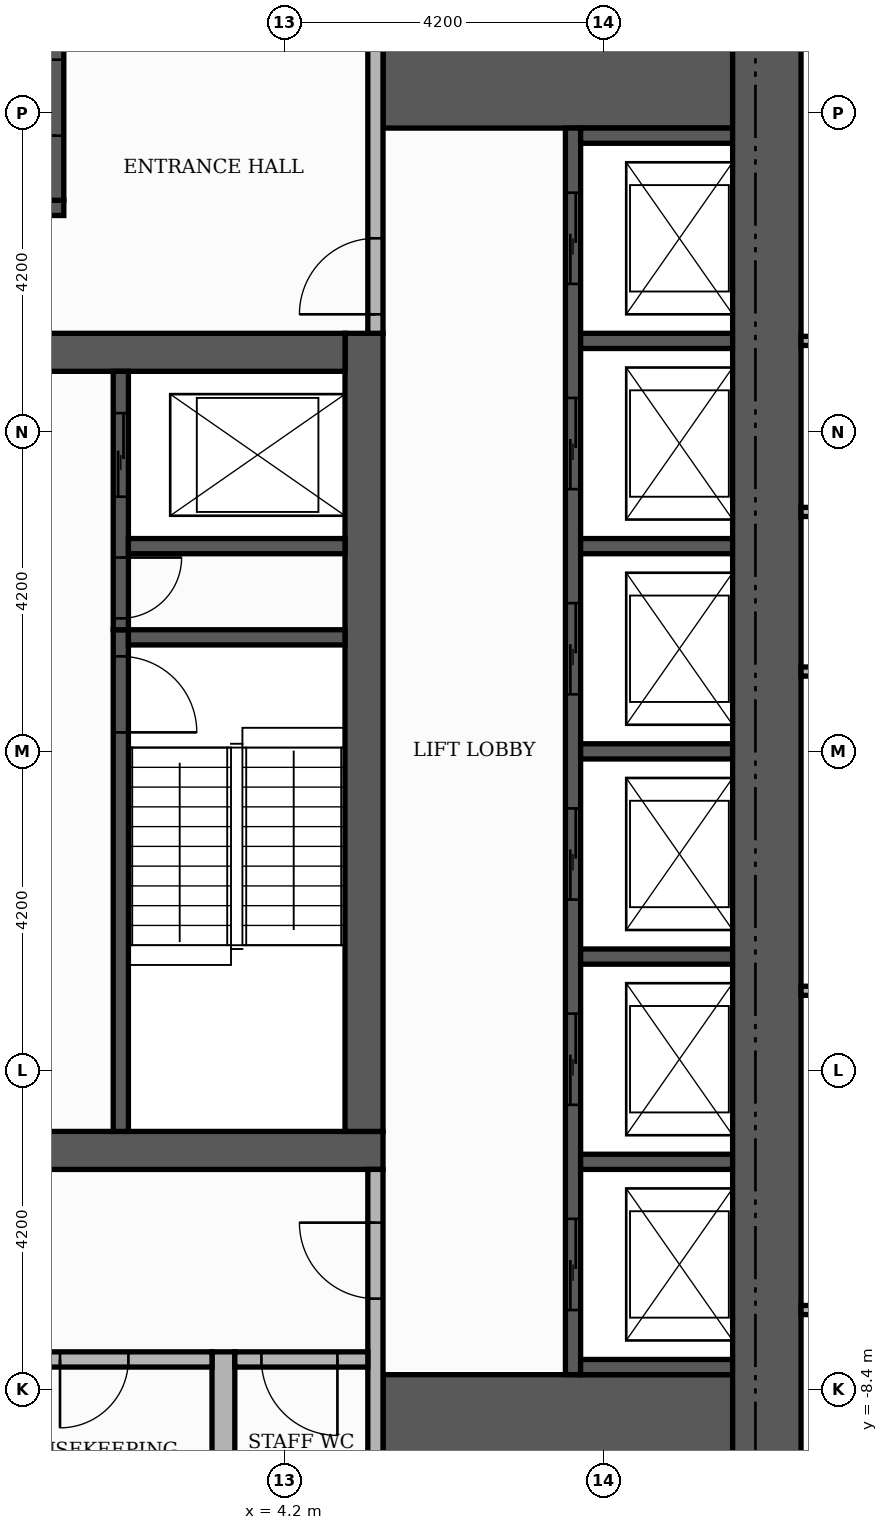
"""IFC4 building model, lengths in metres.
Left out: names, types, materials, properties, quantities, classifications, styles, units other than length and angle.
Written with IfcOpenShell. Run it as: python <this file> out.ifc"""

import sys

from ifc_helpers import new_model, si_unit, direction, frame, frame_2d, origin, place, context, subcontext, project, spatial, rectangle, extrude, element, fill, save


model = new_model("IFC4")
c1 = context("Model", 3, precision=1e-05, world=origin(), true_north=direction((0.0, 1.0)))
c2 = subcontext(c1, "Body", "Model", "MODEL_VIEW")
j1 = project(units=[si_unit("LENGTHUNIT", "METRE"), si_unit("PLANEANGLEUNIT", "RADIAN")], contexts=[c1])
p1 = place(None, origin())
s1 = spatial("IfcSite", under=j1, at=p1, CompositionType="ELEMENT")
p2 = place(p1, origin())
s2 = spatial("IfcBuilding", under=s1, at=p2, CompositionType="ELEMENT")
p3 = place(p2, frame((0.0, 0.0, 211.8)))
s3 = spatial("IfcBuildingStorey", under=s2, at=p3, CompositionType="ELEMENT", Elevation=211.8)
p4 = place(p3, frame((-5.5, -5.25, 0.0), z_axis=(0.0, 0.0, 1.0), x_axis=(1.0, 0.0, 0.0)))
e1 = element("IfcWall", 1, at=p4, inside=s3, PredefinedType="SHEAR", context=c2, shape_type="SweptSolid", body=[
    extrude(rectangle(XDim=11.0, YDim=0.5, at=frame_2d((5.5, 0.0))), origin(), (0.0, 0.0, 1.0), 3.48),
])
p5 = place(p4, frame((4.9, 0.0, 0.0)))
e2 = element("IfcOpeningElement", 2, at=p5, cuts=e1, PredefinedType="OPENING", context=c2, shape_type="SweptSolid", body=[
    extrude(rectangle(XDim=1.2, YDim=2.1, at=frame_2d((0.6, 1.05))), frame((0.0, 0.26, 0.0), z_axis=(0.0, -1.0, 0.0), x_axis=(1.0, 0.0, 0.0)), (0.0, 0.0, 1.0), 0.52),
])
p6 = place(p3, frame((5.25, -5.0, 0.0), z_axis=(0.0, 0.0, 1.0), x_axis=(0.0, 1.0, 0.0)))
e3 = element("IfcWall", 3, at=p6, inside=s3, PredefinedType="SHEAR", context=c2, shape_type="SweptSolid", body=[
    extrude(rectangle(XDim=10.5, YDim=0.5, at=frame_2d((5.25, 0.0))), origin(), (0.0, 0.0, 1.0), 3.48),
])
p7 = place(p3, frame((-5.0, 5.25, 0.0), z_axis=(0.0, 0.0, 1.0), x_axis=(1.0, 0.0, 0.0)))
e4 = element("IfcWall", 4, at=p7, inside=s3, PredefinedType="SHEAR", context=c2, shape_type="SweptSolid", body=[
    extrude(rectangle(XDim=10.0, YDim=0.5, at=frame_2d((5.0, 0.0))), origin(), (0.0, 0.0, 1.0), 3.48),
])
p8 = place(p7, frame((4.4, 0.0, 0.0)))
e5 = element("IfcOpeningElement", 5, at=p8, cuts=e4, PredefinedType="OPENING", context=c2, shape_type="SweptSolid", body=[
    extrude(rectangle(XDim=1.2, YDim=2.1, at=frame_2d((0.6, 1.05))), frame((0.0, 0.26, 0.0), z_axis=(0.0, -1.0, 0.0), x_axis=(1.0, 0.0, 0.0)), (0.0, 0.0, 1.0), 0.52),
])
for number, where, z_axis, x_axis in (
    (6, (5.5, -9.15, 0.0), (0.0, 0.0, 1.0), (1.0, 0.0, 0.0)),
    (7, (5.5, 9.15, 0.0), (0.0, 0.0, 1.0), (1.0, 0.0, 0.0)),
):
    element("IfcWall", number, at=place(p3, frame(where, z_axis=z_axis, x_axis=x_axis)), inside=s3, PredefinedType="SHEAR", context=c2, shape_type="SweptSolid", body=[
        extrude(rectangle(XDim=4.6, YDim=1.9, at=frame_2d((2.3, 0.0))), origin(), (0.0, 0.0, 1.0), 3.48),
    ])
p9 = place(p3, frame((2.05, -5.0, 0.0), z_axis=(0.0, 0.0, 1.0), x_axis=(0.0, 1.0, 0.0)))
e8 = element("IfcWall", 8, at=p9, inside=s3, PredefinedType="SHEAR", context=c2, shape_type="SweptSolid", body=[
    extrude(rectangle(XDim=6.6, YDim=0.2, at=frame_2d((3.3, 0.0))), origin(), (0.0, 0.0, 1.0), 3.48),
])
p10 = place(p9, frame((5.25, 0.0, 0.0)))
e9 = element("IfcOpeningElement", 9, at=p10, cuts=e8, PredefinedType="OPENING", context=c2, shape_type="SweptSolid", body=[
    extrude(rectangle(XDim=1.0, YDim=2.1, at=frame_2d((0.5, 1.05))), frame((0.0, 0.11, 0.0), z_axis=(0.0, -1.0, 0.0), x_axis=(1.0, 0.0, 0.0)), (0.0, 0.0, 1.0), 0.22),
])
p11 = place(p3, frame((2.15, 1.5, 0.0), z_axis=(0.0, 0.0, 1.0), x_axis=(1.0, 0.0, 0.0)))
e10 = element("IfcWall", 10, at=p11, inside=s3, PredefinedType="SHEAR", context=c2, shape_type="SweptSolid", body=[
    extrude(rectangle(XDim=2.85, YDim=0.2, at=frame_2d((1.425, 0.0))), origin(), (0.0, 0.0, 1.0), 3.48),
])
p12 = place(p3, frame((-5.5, 7.15, 0.0), z_axis=(0.0, 0.0, 1.0), x_axis=(1.0, 0.0, 0.0)))
e11 = element("IfcWall", 11, at=p12, inside=s3, PredefinedType="SHEAR", context=c2, shape_type="SweptSolid", body=[
    extrude(rectangle(XDim=6.8, YDim=0.2, at=frame_2d((3.4, 0.0))), origin(), (0.0, 0.0, 1.0), 3.48),
])
p13 = place(p3, frame((1.2, 7.25, 0.0), z_axis=(0.0, 0.0, 1.0), x_axis=(0.0, 1.0, 0.0)))
e12 = element("IfcWall", 12, at=p13, inside=s3, PredefinedType="SHEAR", context=c2, shape_type="SweptSolid", body=[
    extrude(rectangle(XDim=2.85, YDim=0.2, at=frame_2d((1.425, 0.0))), origin(), (0.0, 0.0, 1.0), 3.48),
])
p14 = place(p13, frame((0.85, 0.0, 0.0)))
e13 = element("IfcOpeningElement", 13, at=p14, cuts=e12, PredefinedType="OPENING", context=c2, shape_type="SweptSolid", body=[
    extrude(rectangle(XDim=1.0, YDim=2.1, at=frame_2d((0.5, 1.05))), frame((0.0, 0.11, 0.0), z_axis=(0.0, -1.0, 0.0), x_axis=(1.0, 0.0, 0.0)), (0.0, 0.0, 1.0), 0.22),
])
p15 = place(p3, frame((8.0, -8.2, 0.0), z_axis=(0.0, 0.0, 1.0), x_axis=(0.0, 1.0, 0.0)))
e14 = element("IfcWall", 14, at=p15, inside=s3, PredefinedType="SHEAR", context=c2, shape_type="SweptSolid", body=[
    extrude(rectangle(XDim=16.4, YDim=0.2, at=frame_2d((8.2, 0.0))), origin(), (0.0, 0.0, 1.0), 3.48),
])
p16 = place(p15, frame((0.85, 0.0, 0.0)))
e15 = element("IfcOpeningElement", 15, at=p16, cuts=e14, PredefinedType="OPENING", context=c2, shape_type="SweptSolid", body=[
    extrude(rectangle(XDim=1.2, YDim=2.1, at=frame_2d((0.6, 1.05))), frame((0.0, 0.11, 0.0), z_axis=(0.0, -1.0, 0.0), x_axis=(1.0, 0.0, 0.0)), (0.0, 0.0, 1.0), 0.22),
])
p17 = place(p15, frame((3.55, 0.0, 0.0)))
e16 = element("IfcOpeningElement", 16, at=p17, cuts=e14, PredefinedType="OPENING", context=c2, shape_type="SweptSolid", body=[
    extrude(rectangle(XDim=1.2, YDim=2.1, at=frame_2d((0.6, 1.05))), frame((0.0, 0.11, 0.0), z_axis=(0.0, -1.0, 0.0), x_axis=(1.0, 0.0, 0.0)), (0.0, 0.0, 1.0), 0.22),
])
p18 = place(p15, frame((6.25, 0.0, 0.0)))
e17 = element("IfcOpeningElement", 17, at=p18, cuts=e14, PredefinedType="OPENING", context=c2, shape_type="SweptSolid", body=[
    extrude(rectangle(XDim=1.2, YDim=2.1, at=frame_2d((0.6, 1.05))), frame((0.0, 0.11, 0.0), z_axis=(0.0, -1.0, 0.0), x_axis=(1.0, 0.0, 0.0)), (0.0, 0.0, 1.0), 0.22),
])
p19 = place(p15, frame((8.95, 0.0, 0.0)))
e18 = element("IfcOpeningElement", 18, at=p19, cuts=e14, PredefinedType="OPENING", context=c2, shape_type="SweptSolid", body=[
    extrude(rectangle(XDim=1.2, YDim=2.1, at=frame_2d((0.6, 1.05))), frame((0.0, 0.11, 0.0), z_axis=(0.0, -1.0, 0.0), x_axis=(1.0, 0.0, 0.0)), (0.0, 0.0, 1.0), 0.22),
])
p20 = place(p15, frame((11.65, 0.0, 0.0)))
e19 = element("IfcOpeningElement", 19, at=p20, cuts=e14, PredefinedType="OPENING", context=c2, shape_type="SweptSolid", body=[
    extrude(rectangle(XDim=1.2, YDim=2.1, at=frame_2d((0.6, 1.05))), frame((0.0, 0.11, 0.0), z_axis=(0.0, -1.0, 0.0), x_axis=(1.0, 0.0, 0.0)), (0.0, 0.0, 1.0), 0.22),
])
p21 = place(p15, frame((14.35, 0.0, 0.0)))
e20 = element("IfcOpeningElement", 20, at=p21, cuts=e14, PredefinedType="OPENING", context=c2, shape_type="SweptSolid", body=[
    extrude(rectangle(XDim=1.2, YDim=2.1, at=frame_2d((0.6, 1.05))), frame((0.0, 0.11, 0.0), z_axis=(0.0, -1.0, 0.0), x_axis=(1.0, 0.0, 0.0)), (0.0, 0.0, 1.0), 0.22),
])
for number, where, z_axis, x_axis in (
    (21, (8.1, -8.1, 0.0), (0.0, 0.0, 1.0), (1.0, 0.0, 0.0)),
    (22, (8.1, -5.4, 0.0), (0.0, 0.0, 1.0), (1.0, 0.0, 0.0)),
    (23, (8.1, -2.7, 0.0), (0.0, 0.0, 1.0), (1.0, 0.0, 0.0)),
    (24, (8.1, 0.0, 0.0), (0.0, 0.0, 1.0), (1.0, 0.0, 0.0)),
):
    element("IfcWall", number, at=place(p3, frame(where, z_axis=z_axis, x_axis=x_axis)), inside=s3, PredefinedType="SHEAR", context=c2, shape_type="SweptSolid", body=[
        extrude(rectangle(XDim=2.0, YDim=0.2, at=frame_2d((1.0, 0.0))), origin(), (0.0, 0.0, 1.0), 3.48),
    ])
p22 = place(p3, frame((2.05, 1.6, 0.0), z_axis=(0.0, 0.0, 1.0), x_axis=(0.0, 1.0, 0.0)))
e25 = element("IfcWall", 25, at=p22, inside=s3, PredefinedType="SHEAR", context=c2, shape_type="SweptSolid", body=[
    extrude(rectangle(XDim=3.4, YDim=0.2, at=frame_2d((1.7, 0.0))), origin(), (0.0, 0.0, 1.0), 3.48),
])
p23 = place(p22, frame((1.75, 0.0, 0.0)))
e26 = element("IfcOpeningElement", 26, at=p23, cuts=e25, PredefinedType="OPENING", context=c2, shape_type="SweptSolid", body=[
    extrude(rectangle(XDim=1.1, YDim=2.1, at=frame_2d((0.55, 1.05))), frame((0.0, 0.11, 0.0), z_axis=(0.0, -1.0, 0.0), x_axis=(1.0, 0.0, 0.0)), (0.0, 0.0, 1.0), 0.22),
])
p24 = place(p22, frame((0.15, 0.0, 0.0)))
e27 = element("IfcOpeningElement", 27, at=p24, cuts=e25, PredefinedType="OPENING", context=c2, shape_type="SweptSolid", body=[
    extrude(rectangle(XDim=0.8, YDim=2.1, at=frame_2d((0.4, 1.05))), frame((0.0, 0.11, 0.0), z_axis=(0.0, -1.0, 0.0), x_axis=(1.0, 0.0, 0.0)), (0.0, 0.0, 1.0), 0.22),
])
p25 = place(p3, frame((2.15, 2.7, 0.0), z_axis=(0.0, 0.0, 1.0), x_axis=(1.0, 0.0, 0.0)))
e28 = element("IfcWall", 28, at=p25, inside=s3, PredefinedType="SHEAR", context=c2, shape_type="SweptSolid", body=[
    extrude(rectangle(XDim=2.85, YDim=0.2, at=frame_2d((1.425, 0.0))), origin(), (0.0, 0.0, 1.0), 3.48),
])
for number, where, z_axis, x_axis in (
    (29, (8.1, 2.7, 0.0), (0.0, 0.0, 1.0), (1.0, 0.0, 0.0)),
    (30, (8.1, 5.4, 0.0), (0.0, 0.0, 1.0), (1.0, 0.0, 0.0)),
    (31, (8.1, 8.1, 0.0), (0.0, 0.0, 1.0), (1.0, 0.0, 0.0)),
):
    element("IfcWall", number, at=place(p3, frame(where, z_axis=z_axis, x_axis=x_axis)), inside=s3, PredefinedType="SHEAR", context=c2, shape_type="SweptSolid", body=[
        extrude(rectangle(XDim=2.0, YDim=0.2, at=frame_2d((1.0, 0.0))), origin(), (0.0, 0.0, 1.0), 3.48),
    ])
p26 = place(p3, frame((10.55, -10.1, 0.0), z_axis=(0.0, 0.0, 1.0), x_axis=(0.0, 1.0, 0.0)))
e32 = element("IfcWall", 32, at=p26, inside=s3, PredefinedType="SHEAR", context=c2, shape_type="SweptSolid", body=[
    extrude(rectangle(XDim=20.2, YDim=0.9, at=frame_2d((10.1, 0.0))), origin(), (0.0, 0.0, 1.0), 3.48),
])
p27 = place(p3, frame((3.4, -10.1, 0.0), z_axis=(0.0, 0.0, 1.0), x_axis=(0.0, 1.0, 0.0)))
e33 = element("IfcWall", 33, at=p27, inside=s3, PredefinedType="PARTITIONING", context=c2, shape_type="SweptSolid", body=[
    extrude(rectangle(XDim=2.2, YDim=0.3, at=frame_2d((1.1, 0.0))), origin(), (0.0, 0.0, 1.0), 3.48),
])
p28 = place(p3, frame((5.4, -10.1, 0.0), z_axis=(0.0, 0.0, 1.0), x_axis=(0.0, 1.0, 0.0)))
e34 = element("IfcWall", 34, at=p28, inside=s3, PredefinedType="PARTITIONING", context=c2, shape_type="SweptSolid", body=[
    extrude(rectangle(XDim=4.6, YDim=0.2, at=frame_2d((2.3, 0.0))), origin(), (0.0, 0.0, 1.0), 3.48),
])
p29 = place(p28, frame((2.9, 0.0, 0.0)))
e35 = element("IfcOpeningElement", 35, at=p29, cuts=e34, PredefinedType="OPENING", context=c2, shape_type="SweptSolid", body=[
    extrude(rectangle(XDim=1.0, YDim=2.1, at=frame_2d((0.5, 1.05))), frame((0.0, 0.11, 0.0), z_axis=(0.0, -1.0, 0.0), x_axis=(1.0, 0.0, 0.0)), (0.0, 0.0, 1.0), 0.22),
])
p30 = place(p3, frame((0.1, -8.0, 0.0), z_axis=(0.0, 0.0, 1.0), x_axis=(1.0, 0.0, 0.0)))
e36 = element("IfcWall", 36, at=p30, inside=s3, PredefinedType="PARTITIONING", context=c2, shape_type="SweptSolid", body=[
    extrude(rectangle(XDim=3.15, YDim=0.2, at=frame_2d((1.575, 0.0))), origin(), (0.0, 0.0, 1.0), 3.48),
])
p31 = place(p30, frame((1.15, 0.0, 0.0)))
e37 = element("IfcOpeningElement", 37, at=p31, cuts=e36, PredefinedType="OPENING", context=c2, shape_type="SweptSolid", body=[
    extrude(rectangle(XDim=0.9, YDim=2.1, at=frame_2d((0.45, 1.05))), frame((0.0, 0.11, 0.0), z_axis=(0.0, -1.0, 0.0), x_axis=(1.0, 0.0, 0.0)), (0.0, 0.0, 1.0), 0.22),
])
p32 = place(p3, frame((3.55, -8.0, 0.0), z_axis=(0.0, 0.0, 1.0), x_axis=(1.0, 0.0, 0.0)))
e38 = element("IfcWall", 38, at=p32, inside=s3, PredefinedType="PARTITIONING", context=c2, shape_type="SweptSolid", body=[
    extrude(rectangle(XDim=1.75, YDim=0.2, at=frame_2d((0.875, 0.0))), origin(), (0.0, 0.0, 1.0), 3.48),
])
p33 = place(p32, frame((0.35, 0.0, 0.0)))
e39 = element("IfcOpeningElement", 39, at=p33, cuts=e38, PredefinedType="OPENING", context=c2, shape_type="SweptSolid", body=[
    extrude(rectangle(XDim=1.0, YDim=2.1, at=frame_2d((0.5, 1.05))), frame((0.0, 0.11, 0.0), z_axis=(0.0, -1.0, 0.0), x_axis=(1.0, 0.0, 0.0)), (0.0, 0.0, 1.0), 0.22),
])
p34 = place(p3, frame((5.4, 5.5, 0.0), z_axis=(0.0, 0.0, 1.0), x_axis=(0.0, 1.0, 0.0)))
e40 = element("IfcWall", 40, at=p34, inside=s3, PredefinedType="PARTITIONING", context=c2, shape_type="SweptSolid", body=[
    extrude(rectangle(XDim=4.6, YDim=0.2, at=frame_2d((2.3, 0.0))), origin(), (0.0, 0.0, 1.0), 3.48),
])
p35 = place(p34, frame((0.25, 0.0, 0.0)))
e41 = element("IfcOpeningElement", 41, at=p35, cuts=e40, PredefinedType="OPENING", context=c2, shape_type="SweptSolid", body=[
    extrude(rectangle(XDim=1.0, YDim=2.1, at=frame_2d((0.5, 1.05))), frame((0.0, 0.11, 0.0), z_axis=(0.0, -1.0, 0.0), x_axis=(1.0, 0.0, 0.0)), (0.0, 0.0, 1.0), 0.22),
])
p36 = place(p3, frame((11.0, -7.35, 0.0), z_axis=(0.0, 0.0, 1.0), x_axis=(1.0, 0.0, 0.0)))
e42 = element("IfcWall", 42, at=p36, inside=s3, PredefinedType="PARTITIONING", context=c2, shape_type="SweptSolid", body=[
    extrude(rectangle(XDim=7.62, YDim=0.12, at=frame_2d((3.81, 0.0))), origin(), (0.0, 0.0, 1.0), 3.48),
])
p37 = place(p36, frame((3.36, 0.0, 0.0)))
e43 = element("IfcOpeningElement", 43, at=p37, cuts=e42, PredefinedType="OPENING", context=c2, shape_type="SweptSolid", body=[
    extrude(rectangle(XDim=0.9, YDim=2.1, at=frame_2d((0.45, 1.05))), frame((0.0, 0.07, 0.0), z_axis=(0.0, -1.0, 0.0), x_axis=(1.0, 0.0, 0.0)), (0.0, 0.0, 1.0), 0.14),
])
for number, where, z_axis, x_axis in (
    (44, (11.0, -3.15, 0.0), (0.0, 0.0, 1.0), (1.0, 0.0, 0.0)),
    (45, (11.0, 1.05, 0.0), (0.0, 0.0, 1.0), (1.0, 0.0, 0.0)),
    (46, (11.0, 3.15, 0.0), (0.0, 0.0, 1.0), (1.0, 0.0, 0.0)),
    (47, (11.0, 5.4, 0.0), (0.0, 0.0, 1.0), (1.0, 0.0, 0.0)),
):
    element("IfcWall", number, at=place(p3, frame(where, z_axis=z_axis, x_axis=x_axis)), inside=s3, PredefinedType="PARTITIONING", context=c2, shape_type="SweptSolid", body=[
        extrude(rectangle(XDim=7.62, YDim=0.12, at=frame_2d((3.81, 0.0))), origin(), (0.0, 0.0, 1.0), 3.48),
    ])
p38 = place(p16, origin())
e48 = element("IfcDoor", 48, at=p38, inside=s3, OperationType="SLIDING_TO_LEFT", PredefinedType="DOOR", context=c2, shape_type="SweptSolid", body=[
    extrude(rectangle(XDim=1.2, YDim=2.1, at=frame_2d((0.6, 1.05))), frame((0.0, 0.025, 0.0), z_axis=(0.0, -1.0, 0.0), x_axis=(1.0, 0.0, 0.0)), (0.0, 0.0, 1.0), 0.05),
])
fill(e15, e48)
p39 = place(p17, origin())
e49 = element("IfcDoor", 49, at=p39, inside=s3, OperationType="SLIDING_TO_LEFT", PredefinedType="DOOR", context=c2, shape_type="SweptSolid", body=[
    extrude(rectangle(XDim=1.2, YDim=2.1, at=frame_2d((0.6, 1.05))), frame((0.0, 0.025, 0.0), z_axis=(0.0, -1.0, 0.0), x_axis=(1.0, 0.0, 0.0)), (0.0, 0.0, 1.0), 0.05),
])
fill(e16, e49)
p40 = place(p18, origin())
e50 = element("IfcDoor", 50, at=p40, inside=s3, OperationType="SLIDING_TO_LEFT", PredefinedType="DOOR", context=c2, shape_type="SweptSolid", body=[
    extrude(rectangle(XDim=1.2, YDim=2.1, at=frame_2d((0.6, 1.05))), frame((0.0, 0.025, 0.0), z_axis=(0.0, -1.0, 0.0), x_axis=(1.0, 0.0, 0.0)), (0.0, 0.0, 1.0), 0.05),
])
fill(e17, e50)
p41 = place(p19, origin())
e51 = element("IfcDoor", 51, at=p41, inside=s3, OperationType="SLIDING_TO_LEFT", PredefinedType="DOOR", context=c2, shape_type="SweptSolid", body=[
    extrude(rectangle(XDim=1.2, YDim=2.1, at=frame_2d((0.6, 1.05))), frame((0.0, 0.025, 0.0), z_axis=(0.0, -1.0, 0.0), x_axis=(1.0, 0.0, 0.0)), (0.0, 0.0, 1.0), 0.05),
])
fill(e18, e51)
p42 = place(p20, origin())
e52 = element("IfcDoor", 52, at=p42, inside=s3, OperationType="SLIDING_TO_LEFT", PredefinedType="DOOR", context=c2, shape_type="SweptSolid", body=[
    extrude(rectangle(XDim=1.2, YDim=2.1, at=frame_2d((0.6, 1.05))), frame((0.0, 0.025, 0.0), z_axis=(0.0, -1.0, 0.0), x_axis=(1.0, 0.0, 0.0)), (0.0, 0.0, 1.0), 0.05),
])
fill(e19, e52)
p43 = place(p21, origin())
e53 = element("IfcDoor", 53, at=p43, inside=s3, OperationType="SLIDING_TO_LEFT", PredefinedType="DOOR", context=c2, shape_type="SweptSolid", body=[
    extrude(rectangle(XDim=1.2, YDim=2.1, at=frame_2d((0.6, 1.05))), frame((0.0, 0.025, 0.0), z_axis=(0.0, -1.0, 0.0), x_axis=(1.0, 0.0, 0.0)), (0.0, 0.0, 1.0), 0.05),
])
fill(e20, e53)
p44 = place(p23, origin())
e54 = element("IfcDoor", 54, at=p44, inside=s3, OperationType="SLIDING_TO_LEFT", PredefinedType="DOOR", context=c2, shape_type="SweptSolid", body=[
    extrude(rectangle(XDim=1.1, YDim=2.1, at=frame_2d((0.55, 1.05))), frame((0.0, 0.025, 0.0), z_axis=(0.0, -1.0, 0.0), x_axis=(1.0, 0.0, 0.0)), (0.0, 0.0, 1.0), 0.05),
])
fill(e26, e54)
p45 = place(p10, frame((1.0, 0.0, 0.0), z_axis=(0.0, 0.0, 1.0), x_axis=(-1.0, 0.0, 0.0)))
e55 = element("IfcDoor", 55, at=p45, inside=s3, OperationType="SINGLE_SWING_LEFT", PredefinedType="DOOR", context=c2, shape_type="SweptSolid", body=[
    extrude(rectangle(XDim=1.0, YDim=2.1, at=frame_2d((0.5, 1.05))), frame((0.0, 0.025, 0.0), z_axis=(0.0, -1.0, 0.0), x_axis=(1.0, 0.0, 0.0)), (0.0, 0.0, 1.0), 0.05),
])
fill(e9, e55)
p46 = place(p24, frame((0.8, 0.0, 0.0), z_axis=(0.0, 0.0, 1.0), x_axis=(-1.0, 0.0, 0.0)))
e56 = element("IfcDoor", 56, at=p46, inside=s3, OperationType="SINGLE_SWING_RIGHT", PredefinedType="DOOR", context=c2, shape_type="SweptSolid", body=[
    extrude(rectangle(XDim=0.8, YDim=2.1, at=frame_2d((0.4, 1.05))), frame((0.0, 0.025, 0.0), z_axis=(0.0, -1.0, 0.0), x_axis=(1.0, 0.0, 0.0)), (0.0, 0.0, 1.0), 0.05),
])
fill(e27, e56)
p47 = place(p14, origin())
e57 = element("IfcDoor", 57, at=p47, inside=s3, OperationType="SINGLE_SWING_LEFT", PredefinedType="DOOR", context=c2, shape_type="SweptSolid", body=[
    extrude(rectangle(XDim=1.0, YDim=2.1, at=frame_2d((0.5, 1.05))), frame((0.0, 0.025, 0.0), z_axis=(0.0, -1.0, 0.0), x_axis=(1.0, 0.0, 0.0)), (0.0, 0.0, 1.0), 0.05),
])
fill(e13, e57)
p48 = place(p35, origin())
e58 = element("IfcDoor", 58, at=p48, inside=s3, OperationType="SINGLE_SWING_LEFT", PredefinedType="DOOR", context=c2, shape_type="SweptSolid", body=[
    extrude(rectangle(XDim=1.0, YDim=2.1, at=frame_2d((0.5, 1.05))), frame((0.0, 0.025, 0.0), z_axis=(0.0, -1.0, 0.0), x_axis=(1.0, 0.0, 0.0)), (0.0, 0.0, 1.0), 0.05),
])
fill(e41, e58)
p49 = place(p29, origin())
e59 = element("IfcDoor", 59, at=p49, inside=s3, OperationType="SINGLE_SWING_RIGHT", PredefinedType="DOOR", context=c2, shape_type="SweptSolid", body=[
    extrude(rectangle(XDim=1.0, YDim=2.1, at=frame_2d((0.5, 1.05))), frame((0.0, 0.025, 0.0), z_axis=(0.0, -1.0, 0.0), x_axis=(1.0, 0.0, 0.0)), (0.0, 0.0, 1.0), 0.05),
])
fill(e35, e59)
p50 = place(p31, frame((0.9, 0.0, 0.0), z_axis=(0.0, 0.0, 1.0), x_axis=(-1.0, 0.0, 0.0)))
e60 = element("IfcDoor", 60, at=p50, inside=s3, OperationType="SINGLE_SWING_LEFT", PredefinedType="DOOR", context=c2, shape_type="SweptSolid", body=[
    extrude(rectangle(XDim=0.9, YDim=2.1, at=frame_2d((0.45, 1.05))), frame((0.0, 0.025, 0.0), z_axis=(0.0, -1.0, 0.0), x_axis=(1.0, 0.0, 0.0)), (0.0, 0.0, 1.0), 0.05),
])
fill(e37, e60)
p51 = place(p33, frame((1.0, 0.0, 0.0), z_axis=(0.0, 0.0, 1.0), x_axis=(-1.0, 0.0, 0.0)))
e61 = element("IfcDoor", 61, at=p51, inside=s3, OperationType="SINGLE_SWING_RIGHT", PredefinedType="DOOR", context=c2, shape_type="SweptSolid", body=[
    extrude(rectangle(XDim=1.0, YDim=2.1, at=frame_2d((0.5, 1.05))), frame((0.0, 0.025, 0.0), z_axis=(0.0, -1.0, 0.0), x_axis=(1.0, 0.0, 0.0)), (0.0, 0.0, 1.0), 0.05),
])
fill(e39, e61)
save(model, sys.argv[1])
